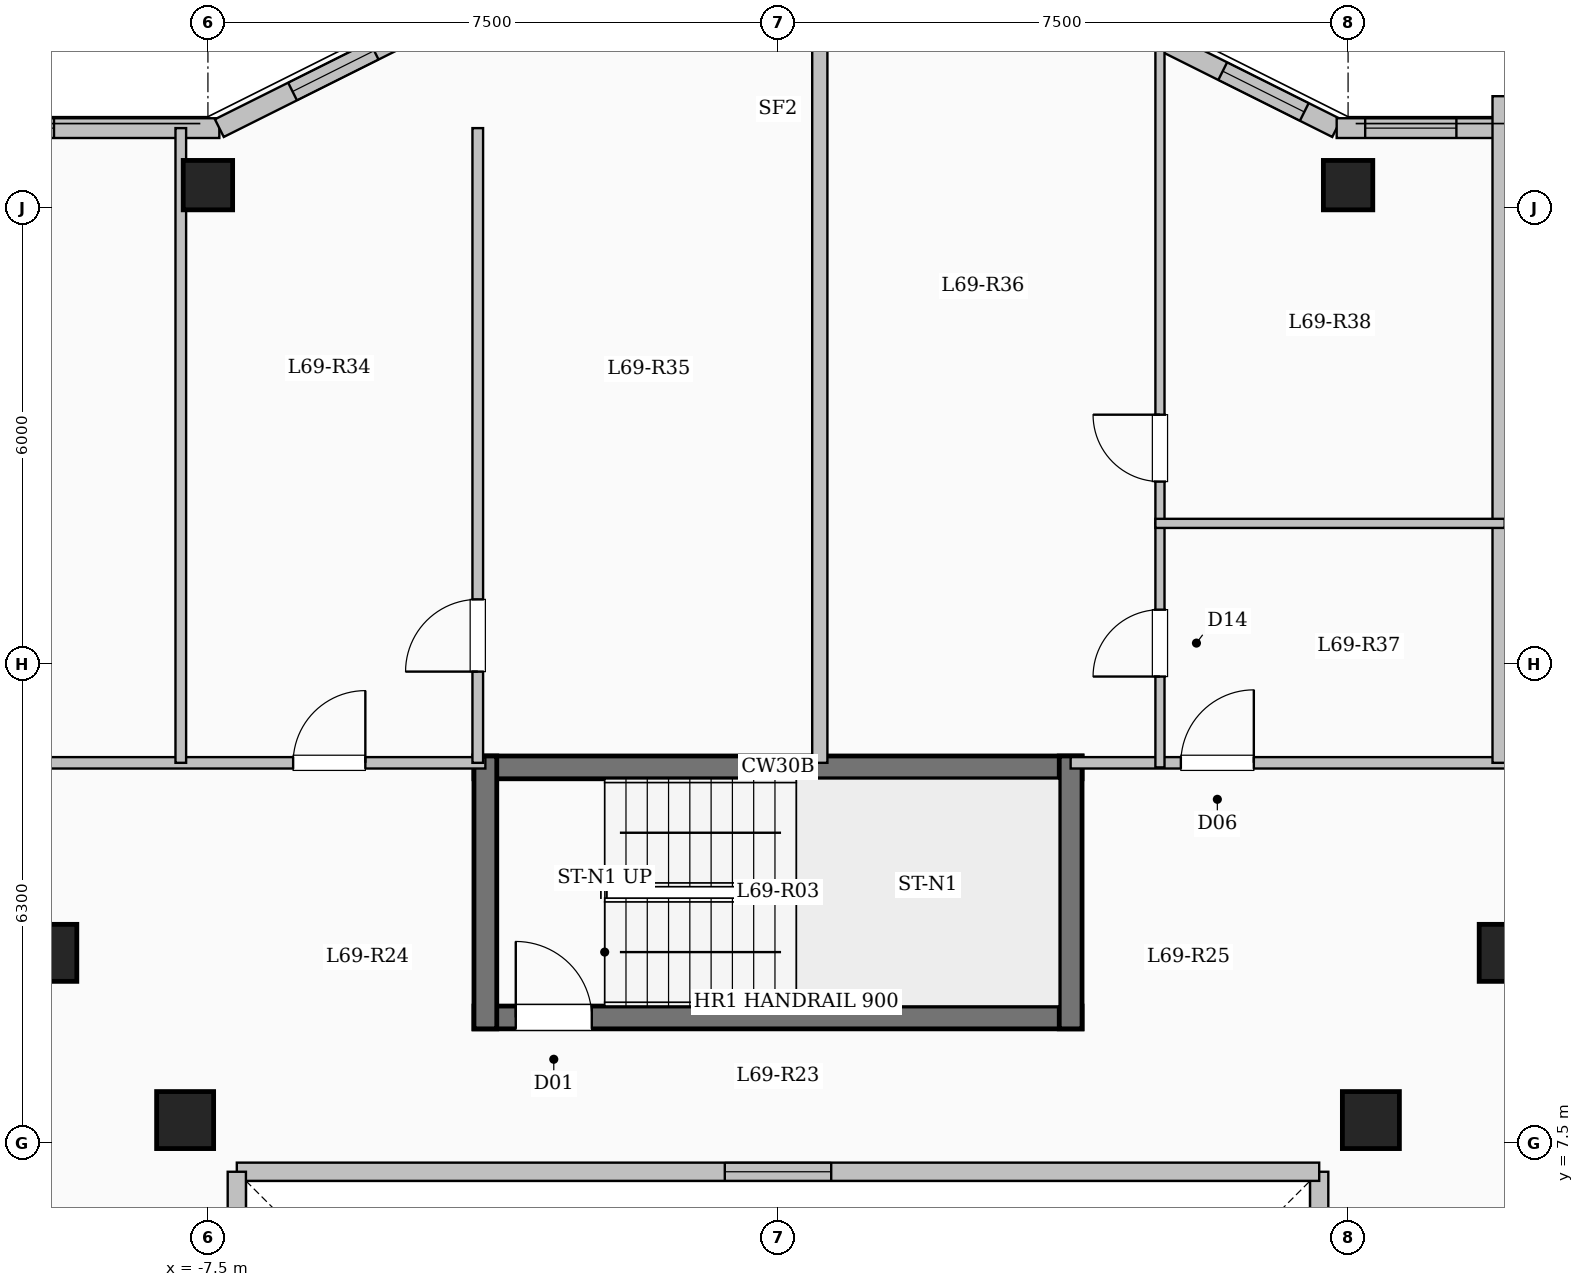
"""IFC4 building model, lengths in metres.
Left out: names, types, materials, properties, quantities, classifications, styles, units other than length and angle.
Written with IfcOpenShell. Run it as: python <this file> out.ifc"""

import sys

from ifc_helpers import new_model, si_unit, direction, frame, frame_2d, origin, origin_2d, place, context, subcontext, project, spatial, rectangle, extrude, element, fill, save


model = new_model("IFC4")
c1 = context("Model", 3, precision=1e-05, world=origin(), true_north=direction((0.0, 1.0)))
c2 = subcontext(c1, "Body", "Model", "MODEL_VIEW")
j1 = project(units=[si_unit("LENGTHUNIT", "METRE"), si_unit("PLANEANGLEUNIT", "RADIAN")], contexts=[c1])
p1 = place(None, origin())
s1 = spatial("IfcSite", under=j1, at=p1, CompositionType="ELEMENT")
p2 = place(p1, origin())
s2 = spatial("IfcBuilding", under=s1, at=p2, CompositionType="ELEMENT")
p3 = place(p2, frame((0.0, 0.0, 254.9)))
s3 = spatial("IfcBuildingStorey", under=s2, at=p3, CompositionType="ELEMENT", Elevation=254.9)
for number, where, z_axis, x_axis in (
    (1, (-7.8, 7.8, 0.0), (0.0, 0.0, 1.0), (1.0, 0.0, 0.0)),
    (2, (7.8, 7.8, 0.0), (0.0, 0.0, 1.0), (1.0, 0.0, 0.0)),
    (3, (-9.6, 10.0, 0.0), (0.0, 0.0, 1.0), (1.0, 0.0, 0.0)),
    (4, (9.6, 10.0, 0.0), (0.0, 0.0, 1.0), (1.0, 0.0, 0.0)),
):
    element("IfcColumn", number, at=place(p3, frame(where, z_axis=z_axis, x_axis=x_axis)), inside=s3, PredefinedType="COLUMN", context=c2, shape_type="SweptSolid", body=[
        extrude(rectangle(XDim=0.75, YDim=0.75, at=origin_2d()), origin(), (0.0, 0.0, 1.0), 3.35),
    ])
for number, where, z_axis, x_axis in (
    (5, (-7.5, 20.1, 0.0), (0.0, 0.0, 1.0), (1.0, 0.0, 0.0)),
    (6, (7.5, 20.1, 0.0), (0.0, 0.0, 1.0), (1.0, 0.0, 0.0)),
):
    element("IfcColumn", number, at=place(p3, frame(where, z_axis=z_axis, x_axis=x_axis)), inside=s3, PredefinedType="COLUMN", context=c2, shape_type="SweptSolid", body=[
        extrude(rectangle(XDim=0.65, YDim=0.65, at=origin_2d()), origin(), (0.0, 0.0, 1.0), 3.35),
    ])
p4 = place(p3, frame((7.12, -7.12, 0.0), z_axis=(0.0, 0.0, 1.0), x_axis=(0.0, 1.0, 0.0)))
e7 = element("IfcWall", 7, at=p4, inside=s3, PredefinedType="SOLIDWALL", context=c2, shape_type="SweptSolid", body=[
    extrude(rectangle(XDim=14.24, YDim=0.24, at=frame_2d((7.12, 0.0))), origin(), (0.0, 0.0, 1.0), 3.1),
])
p5 = place(p4, frame((6.42, 0.0, 0.95)))
e8 = element("IfcOpeningElement", 8, at=p5, cuts=e7, PredefinedType="OPENING", context=c2, shape_type="SweptSolid", body=[
    extrude(rectangle(XDim=1.4, YDim=1.5, at=frame_2d((0.7, 0.75))), frame((0.0, 0.13, 0.0), z_axis=(0.0, -1.0, 0.0), x_axis=(1.0, 0.0, 0.0)), (0.0, 0.0, 1.0), 0.26),
])
p6 = place(p3, frame((7.12, 7.12, 0.0), z_axis=(0.0, 0.0, 1.0), x_axis=(-1.0, 0.0, 0.0)))
e9 = element("IfcWall", 9, at=p6, inside=s3, PredefinedType="SOLIDWALL", context=c2, shape_type="SweptSolid", body=[
    extrude(rectangle(XDim=14.24, YDim=0.24, at=frame_2d((7.12, 0.0))), origin(), (0.0, 0.0, 1.0), 3.1),
])
p7 = place(p6, frame((6.42, 0.0, 0.95)))
e10 = element("IfcOpeningElement", 10, at=p7, cuts=e9, PredefinedType="OPENING", context=c2, shape_type="SweptSolid", body=[
    extrude(rectangle(XDim=1.4, YDim=1.5, at=frame_2d((0.7, 0.75))), frame((0.0, 0.13, 0.0), z_axis=(0.0, -1.0, 0.0), x_axis=(1.0, 0.0, 0.0)), (0.0, 0.0, 1.0), 0.26),
])
p8 = place(p3, frame((-7.12, 7.12, 0.0), z_axis=(0.0, 0.0, 1.0), x_axis=(0.0, -1.0, 0.0)))
e11 = element("IfcWall", 11, at=p8, inside=s3, PredefinedType="SOLIDWALL", context=c2, shape_type="SweptSolid", body=[
    extrude(rectangle(XDim=14.24, YDim=0.24, at=frame_2d((7.12, 0.0))), origin(), (0.0, 0.0, 1.0), 3.1),
])
p9 = place(p8, frame((6.42, 0.0, 0.95)))
e12 = element("IfcOpeningElement", 12, at=p9, cuts=e11, PredefinedType="OPENING", context=c2, shape_type="SweptSolid", body=[
    extrude(rectangle(XDim=1.4, YDim=1.5, at=frame_2d((0.7, 0.75))), frame((0.0, 0.13, 0.0), z_axis=(0.0, -1.0, 0.0), x_axis=(1.0, 0.0, 0.0)), (0.0, 0.0, 1.0), 0.26),
])
p10 = place(p3, frame((-17.85, 20.85, 0.0), z_axis=(0.0, 0.0, 1.0), x_axis=(1.0, 0.0, 0.0)))
e13 = element("IfcWall", 13, at=p10, inside=s3, PredefinedType="SOLIDWALL", context=c2, shape_type="SweptSolid", body=[
    extrude(rectangle(XDim=10.5, YDim=0.26, at=frame_2d((5.25, 0.0))), origin(), (0.0, 0.0, 1.0), 3.1),
])
p11 = place(p10, frame((1.525, 0.0, 0.9)))
e14 = element("IfcOpeningElement", 14, at=p11, cuts=e13, PredefinedType="OPENING", context=c2, shape_type="SweptSolid", body=[
    extrude(rectangle(XDim=2.0, YDim=1.7, at=frame_2d((1.0, 0.85))), frame((0.0, 0.14, 0.0), z_axis=(0.0, -1.0, 0.0), x_axis=(1.0, 0.0, 0.0)), (0.0, 0.0, 1.0), 0.28),
])
p12 = place(p10, frame((6.675, 0.0, 0.9)))
e15 = element("IfcOpeningElement", 15, at=p12, cuts=e13, PredefinedType="OPENING", context=c2, shape_type="SweptSolid", body=[
    extrude(rectangle(XDim=1.65, YDim=1.6, at=frame_2d((0.825, 0.8))), frame((0.0, 0.14, 0.0), z_axis=(0.0, -1.0, 0.0), x_axis=(1.0, 0.0, 0.0)), (0.0, 0.0, 1.0), 0.28),
])
p13 = place(p3, frame((-7.35, 20.85, 0.0), z_axis=(0.0, 0.0, 1.0), x_axis=(0.894427191, 0.4472135955, 0.0)))
e16 = element("IfcWall", 16, at=p13, inside=s3, PredefinedType="SOLIDWALL", context=c2, shape_type="SweptSolid", body=[
    extrude(rectangle(XDim=3.354, YDim=0.26, at=frame_2d((1.677, 0.0))), origin(), (0.0, 0.0, 1.0), 3.1),
])
p14 = place(p13, frame((1.077, 0.0, 0.95)))
e17 = element("IfcOpeningElement", 17, at=p14, cuts=e16, PredefinedType="OPENING", context=c2, shape_type="SweptSolid", body=[
    extrude(rectangle(XDim=1.2, YDim=1.5, at=frame_2d((0.6, 0.75))), frame((0.0, 0.14, 0.0), z_axis=(0.0, -1.0, 0.0), x_axis=(1.0, 0.0, 0.0)), (0.0, 0.0, 1.0), 0.28),
])
p15 = place(p3, frame((4.35, 22.35, 0.0), z_axis=(0.0, 0.0, 1.0), x_axis=(0.894427191, -0.4472135955, 0.0)))
e18 = element("IfcWall", 18, at=p15, inside=s3, PredefinedType="SOLIDWALL", context=c2, shape_type="SweptSolid", body=[
    extrude(rectangle(XDim=3.354, YDim=0.26, at=frame_2d((1.677, 0.0))), origin(), (0.0, 0.0, 1.0), 3.1),
])
p16 = place(p15, frame((1.678, 0.0, 0.95)))
e19 = element("IfcOpeningElement", 19, at=p16, cuts=e18, PredefinedType="OPENING", context=c2, shape_type="SweptSolid", body=[
    extrude(rectangle(XDim=1.2, YDim=1.5, at=frame_2d((0.6, 0.75))), frame((0.0, 0.14, 0.0), z_axis=(0.0, -1.0, 0.0), x_axis=(1.0, 0.0, 0.0)), (0.0, 0.0, 1.0), 0.28),
])
p17 = place(p3, frame((7.35, 20.85, 0.0), z_axis=(0.0, 0.0, 1.0), x_axis=(1.0, 0.0, 0.0)))
e20 = element("IfcWall", 20, at=p17, inside=s3, PredefinedType="SOLIDWALL", context=c2, shape_type="SweptSolid", body=[
    extrude(rectangle(XDim=10.5, YDim=0.26, at=frame_2d((5.25, 0.0))), origin(), (0.0, 0.0, 1.0), 3.1),
])
p18 = place(p17, frame((0.375, 0.0, 0.95)))
e21 = element("IfcOpeningElement", 21, at=p18, cuts=e20, PredefinedType="OPENING", context=c2, shape_type="SweptSolid", body=[
    extrude(rectangle(XDim=1.2, YDim=1.5, at=frame_2d((0.6, 0.75))), frame((0.0, 0.14, 0.0), z_axis=(0.0, -1.0, 0.0), x_axis=(1.0, 0.0, 0.0)), (0.0, 0.0, 1.0), 0.28),
])
p19 = place(p17, frame((2.975, 0.0, 0.9)))
e22 = element("IfcOpeningElement", 22, at=p19, cuts=e20, PredefinedType="OPENING", context=c2, shape_type="SweptSolid", body=[
    extrude(rectangle(XDim=1.65, YDim=1.6, at=frame_2d((0.825, 0.8))), frame((0.0, 0.14, 0.0), z_axis=(0.0, -1.0, 0.0), x_axis=(1.0, 0.0, 0.0)), (0.0, 0.0, 1.0), 0.28),
])
p20 = place(p17, frame((6.1, 0.0, 0.95)))
e23 = element("IfcOpeningElement", 23, at=p20, cuts=e20, PredefinedType="OPENING", context=c2, shape_type="SweptSolid", body=[
    extrude(rectangle(XDim=1.2, YDim=1.5, at=frame_2d((0.6, 0.75))), frame((0.0, 0.14, 0.0), z_axis=(0.0, -1.0, 0.0), x_axis=(1.0, 0.0, 0.0)), (0.0, 0.0, 1.0), 0.28),
])
p21 = place(p17, frame((8.575, 0.0, 0.95)))
e24 = element("IfcOpeningElement", 24, at=p21, cuts=e20, PredefinedType="OPENING", context=c2, shape_type="SweptSolid", body=[
    extrude(rectangle(XDim=1.2, YDim=1.5, at=frame_2d((0.6, 0.75))), frame((0.0, 0.14, 0.0), z_axis=(0.0, -1.0, 0.0), x_axis=(1.0, 0.0, 0.0)), (0.0, 0.0, 1.0), 0.28),
])
p22 = place(p3, frame((-4.0, 12.44, 0.0), z_axis=(0.0, 0.0, 1.0), x_axis=(1.0, 0.0, 0.0)))
e25 = element("IfcWall", 25, at=p22, inside=s3, PredefinedType="SHEAR", context=c2, shape_type="SweptSolid", body=[
    extrude(rectangle(XDim=8.0, YDim=0.3, at=frame_2d((4.0, 0.0))), origin(), (0.0, 0.0, 1.0), 3.35),
])
p23 = place(p3, frame((-4.0, 9.15, 0.0), z_axis=(0.0, 0.0, 1.0), x_axis=(1.0, 0.0, 0.0)))
e26 = element("IfcWall", 26, at=p23, inside=s3, PredefinedType="SHEAR", context=c2, shape_type="SweptSolid", body=[
    extrude(rectangle(XDim=8.0, YDim=0.3, at=frame_2d((4.0, 0.0))), origin(), (0.0, 0.0, 1.0), 3.35),
])
p24 = place(p23, frame((0.55, 0.0, 0.0)))
e27 = element("IfcOpeningElement", 27, at=p24, cuts=e26, PredefinedType="OPENING", context=c2, shape_type="SweptSolid", body=[
    extrude(rectangle(XDim=1.0, YDim=2.15, at=frame_2d((0.5, 1.075))), frame((0.0, 0.16, 0.0), z_axis=(0.0, -1.0, 0.0), x_axis=(1.0, 0.0, 0.0)), (0.0, 0.0, 1.0), 0.32),
])
for number, where, z_axis, x_axis in (
    (28, (-3.85, 9.0, 0.0), (0.0, 0.0, 1.0), (0.0, 1.0, 0.0)),
    (29, (3.85, 9.0, 0.0), (0.0, 0.0, 1.0), (0.0, 1.0, 0.0)),
):
    element("IfcWall", number, at=place(p3, frame(where, z_axis=z_axis, x_axis=x_axis)), inside=s3, PredefinedType="SHEAR", context=c2, shape_type="SweptSolid", body=[
        extrude(rectangle(XDim=3.59, YDim=0.3, at=frame_2d((1.795, 0.0))), origin(), (0.0, 0.0, 1.0), 3.35),
    ])
p25 = place(p3, frame((-17.75, 12.5, 0.0), z_axis=(0.0, 0.0, 1.0), x_axis=(1.0, 0.0, 0.0)))
e30 = element("IfcWall", 30, at=p25, inside=s3, PredefinedType="PARTITIONING", context=c2, shape_type="SweptSolid", body=[
    extrude(rectangle(XDim=13.9, YDim=0.15, at=frame_2d((6.95, 0.0))), origin(), (0.0, 0.0, 1.0), 3.1),
])
p26 = place(p25, frame((1.968, 0.0, 0.0)))
e31 = element("IfcOpeningElement", 31, at=p26, cuts=e30, PredefinedType="OPENING", context=c2, shape_type="SweptSolid", body=[
    extrude(rectangle(XDim=0.95, YDim=2.15, at=frame_2d((0.475, 1.075))), frame((0.0, 0.085, 0.0), z_axis=(0.0, -1.0, 0.0), x_axis=(1.0, 0.0, 0.0)), (0.0, 0.0, 1.0), 0.17),
])
p27 = place(p25, frame((6.944, 0.0, 0.0)))
e32 = element("IfcOpeningElement", 32, at=p27, cuts=e30, PredefinedType="OPENING", context=c2, shape_type="SweptSolid", body=[
    extrude(rectangle(XDim=0.95, YDim=2.15, at=frame_2d((0.475, 1.075))), frame((0.0, 0.085, 0.0), z_axis=(0.0, -1.0, 0.0), x_axis=(1.0, 0.0, 0.0)), (0.0, 0.0, 1.0), 0.17),
])
p28 = place(p25, frame((11.371, 0.0, 0.0)))
e33 = element("IfcOpeningElement", 33, at=p28, cuts=e30, PredefinedType="OPENING", context=c2, shape_type="SweptSolid", body=[
    extrude(rectangle(XDim=0.95, YDim=2.15, at=frame_2d((0.475, 1.075))), frame((0.0, 0.085, 0.0), z_axis=(0.0, -1.0, 0.0), x_axis=(1.0, 0.0, 0.0)), (0.0, 0.0, 1.0), 0.17),
])
p29 = place(p3, frame((3.85, 12.5, 0.0), z_axis=(0.0, 0.0, 1.0), x_axis=(1.0, 0.0, 0.0)))
e34 = element("IfcWall", 34, at=p29, inside=s3, PredefinedType="PARTITIONING", context=c2, shape_type="SweptSolid", body=[
    extrude(rectangle(XDim=13.9, YDim=0.15, at=frame_2d((6.95, 0.0))), origin(), (0.0, 0.0, 1.0), 3.1),
])
p30 = place(p29, frame((1.45, 0.0, 0.0)))
e35 = element("IfcOpeningElement", 35, at=p30, cuts=e34, PredefinedType="OPENING", context=c2, shape_type="SweptSolid", body=[
    extrude(rectangle(XDim=0.96, YDim=2.15, at=frame_2d((0.48, 1.075))), frame((0.0, 0.085, 0.0), z_axis=(0.0, -1.0, 0.0), x_axis=(1.0, 0.0, 0.0)), (0.0, 0.0, 1.0), 0.17),
])
p31 = place(p29, frame((6.35, 0.0, 0.0)))
e36 = element("IfcOpeningElement", 36, at=p31, cuts=e34, PredefinedType="OPENING", context=c2, shape_type="SweptSolid", body=[
    extrude(rectangle(XDim=0.96, YDim=2.15, at=frame_2d((0.48, 1.075))), frame((0.0, 0.085, 0.0), z_axis=(0.0, -1.0, 0.0), x_axis=(1.0, 0.0, 0.0)), (0.0, 0.0, 1.0), 0.17),
])
p32 = place(p3, frame((0.55, 12.5, 0.0), z_axis=(0.0, 0.0, 1.0), x_axis=(0.0, 1.0, 0.0)))
e37 = element("IfcWall", 37, at=p32, inside=s3, PredefinedType="SOLIDWALL", context=c2, shape_type="SweptSolid", body=[
    extrude(rectangle(XDim=9.88, YDim=0.2, at=frame_2d((4.94, 0.0))), origin(), (0.0, 0.0, 1.0), 3.1),
])
p33 = place(p3, frame((-3.95, 12.5, 0.0), z_axis=(0.0, 0.0, 1.0), x_axis=(0.0, 1.0, 0.0)))
e38 = element("IfcWall", 38, at=p33, inside=s3, PredefinedType="PARTITIONING", context=c2, shape_type="SweptSolid", body=[
    extrude(rectangle(XDim=8.35, YDim=0.14, at=frame_2d((4.175, 0.0))), origin(), (0.0, 0.0, 1.0), 3.1),
])
p34 = place(p33, frame((1.2, 0.0, 0.0)))
e39 = element("IfcOpeningElement", 39, at=p34, cuts=e38, PredefinedType="OPENING", context=c2, shape_type="SweptSolid", body=[
    extrude(rectangle(XDim=0.95, YDim=2.15, at=frame_2d((0.475, 1.075))), frame((0.0, 0.08, 0.0), z_axis=(0.0, -1.0, 0.0), x_axis=(1.0, 0.0, 0.0)), (0.0, 0.0, 1.0), 0.16),
])
p35 = place(p3, frame((-7.857, 12.5, 0.0), z_axis=(0.0, 0.0, 1.0), x_axis=(0.0, 1.0, 0.0)))
e40 = element("IfcWall", 40, at=p35, inside=s3, PredefinedType="PARTITIONING", context=c2, shape_type="SweptSolid", body=[
    extrude(rectangle(XDim=8.35, YDim=0.14, at=frame_2d((4.175, 0.0))), origin(), (0.0, 0.0, 1.0), 2.685),
])
p36 = place(p3, frame((9.5, 12.5, 0.0), z_axis=(0.0, 0.0, 1.0), x_axis=(0.0, 1.0, 0.0)))
e41 = element("IfcWall", 41, at=p36, inside=s3, PredefinedType="SOLIDWALL", context=c2, shape_type="SweptSolid", body=[
    extrude(rectangle(XDim=8.77, YDim=0.2, at=frame_2d((4.385, 0.0))), origin(), (0.0, 0.0, 1.0), 3.1),
])
p37 = place(p3, frame((5.025, 12.44, 0.0), z_axis=(0.0, 0.0, 1.0), x_axis=(0.0, 1.0, 0.0)))
e42 = element("IfcWall", 42, at=p37, inside=s3, PredefinedType="PARTITIONING", context=c2, shape_type="SweptSolid", body=[
    extrude(rectangle(XDim=3.21, YDim=0.12, at=frame_2d((1.605, 0.0))), origin(), (0.0, 0.0, 1.0), 3.1),
])
p38 = place(p37, frame((1.195, 0.0, 0.0)))
e43 = element("IfcOpeningElement", 43, at=p38, cuts=e42, PredefinedType="OPENING", context=c2, shape_type="SweptSolid", body=[
    extrude(rectangle(XDim=0.88, YDim=2.1, at=frame_2d((0.44, 1.05))), frame((0.0, 0.07, 0.0), z_axis=(0.0, -1.0, 0.0), x_axis=(1.0, 0.0, 0.0)), (0.0, 0.0, 1.0), 0.14),
])
p39 = place(p3, frame((5.025, 15.65, 0.0), z_axis=(0.0, 0.0, 1.0), x_axis=(0.0, 1.0, 0.0)))
e44 = element("IfcWall", 44, at=p39, inside=s3, PredefinedType="PARTITIONING", context=c2, shape_type="SweptSolid", body=[
    extrude(rectangle(XDim=6.724, YDim=0.12, at=frame_2d((3.362, 0.0))), origin(), (0.0, 0.0, 1.0), 3.1),
])
p40 = place(p39, frame((0.55, 0.0, 0.0)))
e45 = element("IfcOpeningElement", 45, at=p40, cuts=e44, PredefinedType="OPENING", context=c2, shape_type="SweptSolid", body=[
    extrude(rectangle(XDim=0.88, YDim=2.1, at=frame_2d((0.44, 1.05))), frame((0.0, 0.07, 0.0), z_axis=(0.0, -1.0, 0.0), x_axis=(1.0, 0.0, 0.0)), (0.0, 0.0, 1.0), 0.14),
])
p41 = place(p3, frame((4.965, 15.65, 0.0), z_axis=(0.0, 0.0, 1.0), x_axis=(1.0, 0.0, 0.0)))
e46 = element("IfcWall", 46, at=p41, inside=s3, PredefinedType="PARTITIONING", context=c2, shape_type="SweptSolid", body=[
    extrude(rectangle(XDim=4.595, YDim=0.12, at=frame_2d((2.297, 0.0))), origin(), (0.0, 0.0, 1.0), 2.785),
])
p42 = place(p7, origin())
e47 = element("IfcWindow", 47, at=p42, inside=s3, PartitioningType="SINGLE_PANEL", PredefinedType="WINDOW", context=c2, shape_type="SweptSolid", body=[
    extrude(rectangle(XDim=1.4, YDim=1.5, at=frame_2d((0.7, 0.75))), frame((0.0, 0.03, 0.0), z_axis=(0.0, -1.0, 0.0), x_axis=(1.0, 0.0, 0.0)), (0.0, 0.0, 1.0), 0.06),
])
fill(e10, e47)
p43 = place(p12, origin())
e48 = element("IfcWindow", 48, at=p43, inside=s3, PartitioningType="SINGLE_PANEL", PredefinedType="WINDOW", context=c2, shape_type="SweptSolid", body=[
    extrude(rectangle(XDim=1.65, YDim=1.6, at=frame_2d((0.825, 0.8))), frame((0.0, 0.03, 0.0), z_axis=(0.0, -1.0, 0.0), x_axis=(1.0, 0.0, 0.0)), (0.0, 0.0, 1.0), 0.06),
])
fill(e15, e48)
p44 = place(p14, origin())
e49 = element("IfcWindow", 49, at=p44, inside=s3, PartitioningType="SINGLE_PANEL", PredefinedType="WINDOW", context=c2, shape_type="SweptSolid", body=[
    extrude(rectangle(XDim=1.2, YDim=1.5, at=frame_2d((0.6, 0.75))), frame((0.0, 0.03, 0.0), z_axis=(0.0, -1.0, 0.0), x_axis=(1.0, 0.0, 0.0)), (0.0, 0.0, 1.0), 0.06),
])
fill(e17, e49)
p45 = place(p16, origin())
e50 = element("IfcWindow", 50, at=p45, inside=s3, PartitioningType="SINGLE_PANEL", PredefinedType="WINDOW", context=c2, shape_type="SweptSolid", body=[
    extrude(rectangle(XDim=1.2, YDim=1.5, at=frame_2d((0.6, 0.75))), frame((0.0, 0.03, 0.0), z_axis=(0.0, -1.0, 0.0), x_axis=(1.0, 0.0, 0.0)), (0.0, 0.0, 1.0), 0.06),
])
fill(e19, e50)
p46 = place(p18, origin())
e51 = element("IfcWindow", 51, at=p46, inside=s3, PartitioningType="SINGLE_PANEL", PredefinedType="WINDOW", context=c2, shape_type="SweptSolid", body=[
    extrude(rectangle(XDim=1.2, YDim=1.5, at=frame_2d((0.6, 0.75))), frame((0.0, 0.03, 0.0), z_axis=(0.0, -1.0, 0.0), x_axis=(1.0, 0.0, 0.0)), (0.0, 0.0, 1.0), 0.06),
])
fill(e21, e51)
p47 = place(p24, origin())
e52 = element("IfcDoor", 52, at=p47, inside=s3, OperationType="SINGLE_SWING_LEFT", PredefinedType="DOOR", context=c2, shape_type="SweptSolid", body=[
    extrude(rectangle(XDim=1.0, YDim=2.15, at=frame_2d((0.5, 1.075))), frame((0.0, 0.025, 0.0), z_axis=(0.0, -1.0, 0.0), x_axis=(1.0, 0.0, 0.0)), (0.0, 0.0, 1.0), 0.05),
])
fill(e27, e52)
p48 = place(p28, origin())
e53 = element("IfcDoor", 53, at=p48, inside=s3, OperationType="SINGLE_SWING_RIGHT", PredefinedType="DOOR", context=c2, shape_type="SweptSolid", body=[
    extrude(rectangle(XDim=0.95, YDim=2.15, at=frame_2d((0.475, 1.075))), frame((0.0, 0.025, 0.0), z_axis=(0.0, -1.0, 0.0), x_axis=(1.0, 0.0, 0.0)), (0.0, 0.0, 1.0), 0.05),
])
fill(e33, e53)
p49 = place(p34, origin())
e54 = element("IfcDoor", 54, at=p49, inside=s3, OperationType="SINGLE_SWING_LEFT", PredefinedType="DOOR", context=c2, shape_type="SweptSolid", body=[
    extrude(rectangle(XDim=0.95, YDim=2.15, at=frame_2d((0.475, 1.075))), frame((0.0, 0.025, 0.0), z_axis=(0.0, -1.0, 0.0), x_axis=(1.0, 0.0, 0.0)), (0.0, 0.0, 1.0), 0.05),
])
fill(e39, e54)
p50 = place(p30, origin())
e55 = element("IfcDoor", 55, at=p50, inside=s3, OperationType="SINGLE_SWING_RIGHT", PredefinedType="DOOR", context=c2, shape_type="SweptSolid", body=[
    extrude(rectangle(XDim=0.96, YDim=2.15, at=frame_2d((0.48, 1.075))), frame((0.0, 0.025, 0.0), z_axis=(0.0, -1.0, 0.0), x_axis=(1.0, 0.0, 0.0)), (0.0, 0.0, 1.0), 0.05),
])
fill(e35, e55)
p51 = place(p38, origin())
e56 = element("IfcDoor", 56, at=p51, inside=s3, OperationType="SINGLE_SWING_LEFT", PredefinedType="DOOR", context=c2, shape_type="SweptSolid", body=[
    extrude(rectangle(XDim=0.88, YDim=2.1, at=frame_2d((0.44, 1.05))), frame((0.0, 0.025, 0.0), z_axis=(0.0, -1.0, 0.0), x_axis=(1.0, 0.0, 0.0)), (0.0, 0.0, 1.0), 0.05),
])
fill(e43, e56)
p52 = place(p40, origin())
e57 = element("IfcDoor", 57, at=p52, inside=s3, OperationType="SINGLE_SWING_RIGHT", PredefinedType="DOOR", context=c2, shape_type="SweptSolid", body=[
    extrude(rectangle(XDim=0.88, YDim=2.1, at=frame_2d((0.44, 1.05))), frame((0.0, 0.025, 0.0), z_axis=(0.0, -1.0, 0.0), x_axis=(1.0, 0.0, 0.0)), (0.0, 0.0, 1.0), 0.05),
])
fill(e45, e57)
save(model, sys.argv[1])
